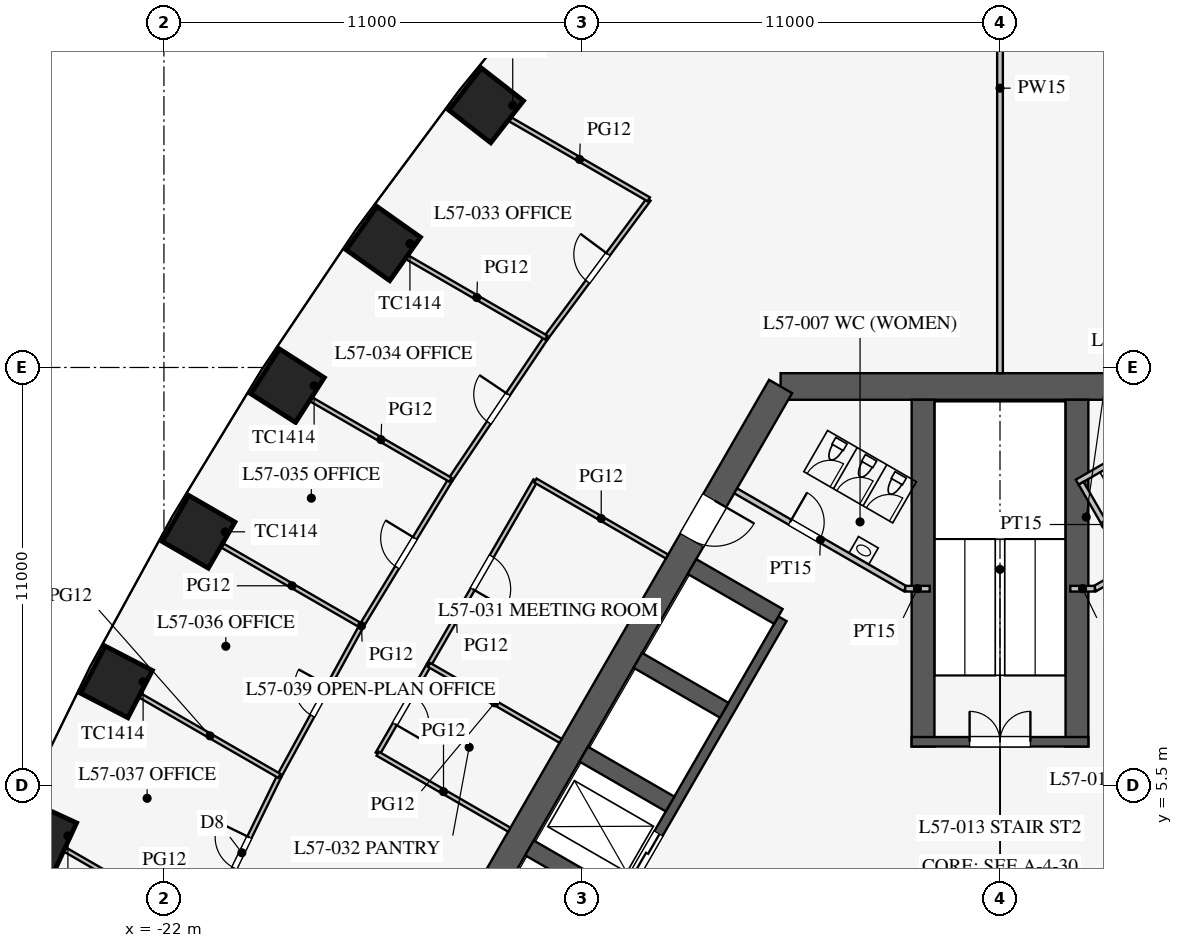
"""IFC4 building model, lengths in metres.
Left out: names, types, materials, properties, quantities, classifications, styles, units other than length and angle.
Written with IfcOpenShell. Run it as: python <this file> out.ifc"""

import sys

from ifc_helpers import new_model, si_unit, direction, frame, frame_2d, origin, origin_2d, place, context, subcontext, project, spatial, rectangle, extrude, element, fill, save


model = new_model("IFC4")
c1 = context("Model", 3, precision=1e-05, world=origin(), true_north=direction((0.0, 1.0)))
c2 = subcontext(c1, "Body", "Model", "MODEL_VIEW")
j1 = project(units=[si_unit("LENGTHUNIT", "METRE"), si_unit("PLANEANGLEUNIT", "RADIAN")], contexts=[c1])
p1 = place(None, origin())
s1 = spatial("IfcSite", under=j1, at=p1, CompositionType="ELEMENT")
p2 = place(p1, origin())
s2 = spatial("IfcBuilding", under=s1, at=p2, CompositionType="ELEMENT")
p3 = place(p2, frame((0.0, 0.0, 248.5)))
s3 = spatial("IfcBuildingStorey", under=s2, at=p3, CompositionType="ELEMENT", Elevation=248.5)
for number, where, z_axis, x_axis in (
    (1, (-13.522, 23.396, 0.0), (0.0, 0.0, 1.0), (-0.615, -0.789, 0.0)),
    (2, (-16.227, 19.761, 0.0), (0.0, 0.0, 1.0), (-0.577, -0.816, 0.0)),
    (3, (-18.748, 16.02, 0.0), (0.0, 0.0, 1.0), (-0.539, -0.842, 0.0)),
    (4, (-21.088, 12.175, 0.0), (0.0, 0.0, 1.0), (-0.5, -0.866, 0.0)),
    (5, (-23.248, 8.226, 0.0), (0.0, 0.0, 1.0), (-0.46, -0.888, 0.0)),
    (6, (-25.227, 4.172, 0.0), (0.0, 0.0, 1.0), (-0.418, -0.908, 0.0)),
):
    element("IfcColumn", number, at=place(p3, frame(where, z_axis=z_axis, x_axis=x_axis)), inside=s3, PredefinedType="COLUMN", context=c2, shape_type="SweptSolid", body=[
        extrude(rectangle(XDim=1.4, YDim=1.4, at=origin_2d()), origin(), (0.0, 0.0, 1.0), 4.2),
    ])
p4 = place(p3, frame((5.773, 16.0, 0.0), z_axis=(0.0, 0.0, 1.0), x_axis=(-1.0, 0.0, 0.0)))
e7 = element("IfcWall", 7, at=p4, inside=s3, PredefinedType="SHEAR", context=c2, shape_type="SweptSolid", body=[
    extrude(rectangle(XDim=11.547, YDim=0.7, at=frame_2d((5.773, 0.0))), origin(), (0.0, 0.0, 1.0), 4.2),
])
p5 = place(p3, frame((-5.773, 16.0, 0.0), z_axis=(0.0, 0.0, 1.0), x_axis=(-0.500002442456, -0.866023993627, 0.0)))
e8 = element("IfcWall", 8, at=p5, inside=s3, PredefinedType="SHEAR", context=c2, shape_type="SweptSolid", body=[
    extrude(rectangle(XDim=21.939, YDim=0.7, at=frame_2d((10.97, 0.0))), origin(), (0.0, 0.0, 1.0), 4.2),
])
p6 = place(p5, frame((17.27, 0.0, 0.0)))
e9 = element("IfcOpeningElement", 9, at=p6, cuts=e8, PredefinedType="OPENING", context=c2, shape_type="SweptSolid", body=[
    extrude(rectangle(XDim=1.2, YDim=2.1, at=frame_2d((0.6, 1.05))), frame((0.0, 0.36, 0.0), z_axis=(0.0, -1.0, 0.0), x_axis=(1.0, 0.0, 0.0)), (0.0, 0.0, 1.0), 0.72),
])
p7 = place(p5, frame((3.47, 0.0, 0.0)))
e10 = element("IfcOpeningElement", 10, at=p7, cuts=e8, PredefinedType="OPENING", context=c2, shape_type="SweptSolid", body=[
    extrude(rectangle(XDim=1.2, YDim=2.1, at=frame_2d((0.6, 1.05))), frame((0.0, 0.36, 0.0), z_axis=(0.0, -1.0, 0.0), x_axis=(1.0, 0.0, 0.0)), (0.0, 0.0, 1.0), 0.72),
])
p8 = place(p3, frame((-5.724, 9.886, 0.0), z_axis=(0.0, 0.0, 1.0), x_axis=(-0.500001763848, -0.866024385424, 0.0)))
e11 = element("IfcWall", 11, at=p8, inside=s3, PredefinedType="SHEAR", context=c2, shape_type="SweptSolid", body=[
    extrude(rectangle(XDim=11.4, YDim=0.25, at=frame_2d((5.7, 0.0))), origin(), (0.0, 0.0, 1.0), 4.2),
])
p9 = place(p8, frame((6.525, 0.0, 0.0)))
e12 = element("IfcOpeningElement", 12, at=p9, cuts=e11, PredefinedType="OPENING", context=c2, shape_type="SweptSolid", body=[
    extrude(rectangle(XDim=1.2, YDim=2.2, at=frame_2d((0.6, 1.1))), frame((0.0, 0.135, 0.0), z_axis=(0.0, -1.0, 0.0), x_axis=(1.0, 0.0, 0.0)), (0.0, 0.0, 1.0), 0.27),
])
p10 = place(p8, frame((9.375, 0.0, 0.0)))
e13 = element("IfcOpeningElement", 13, at=p10, cuts=e11, PredefinedType="OPENING", context=c2, shape_type="SweptSolid", body=[
    extrude(rectangle(XDim=1.2, YDim=2.2, at=frame_2d((0.6, 1.1))), frame((0.0, 0.135, 0.0), z_axis=(0.0, -1.0, 0.0), x_axis=(1.0, 0.0, 0.0)), (0.0, 0.0, 1.0), 0.27),
])
for number, where, z_axis, x_axis in (
    (14, (-5.832, 9.949, 0.0), (0.0, 0.0, 1.0), (-0.866, 0.5, 0.0)),
    (15, (-7.257, 7.481, 0.0), (0.0, 0.0, 1.0), (-0.866, 0.5, 0.0)),
    (16, (-8.682, 5.012, 0.0), (0.0, 0.0, 1.0), (-0.866, 0.5, 0.0)),
    (17, (-10.107, 2.544, 0.0), (0.0, 0.0, 1.0), (-0.866, 0.5, 0.0)),
):
    element("IfcWall", number, at=place(p3, frame(where, z_axis=z_axis, x_axis=x_axis)), inside=s3, PredefinedType="SHEAR", context=c2, shape_type="SweptSolid", body=[
        extrude(rectangle(XDim=2.625, YDim=0.45, at=frame_2d((1.312, 0.0))), origin(), (0.0, 0.0, 1.0), 4.2),
    ])
for number, where, z_axis, x_axis in (
    (18, (2.025, 6.525, 0.0), (0.0, 0.0, 1.0), (0.0, 1.0, 0.0)),
    (19, (-2.025, 6.525, 0.0), (0.0, 0.0, 1.0), (0.0, 1.0, 0.0)),
):
    element("IfcWall", number, at=place(p3, frame(where, z_axis=z_axis, x_axis=x_axis)), inside=s3, PredefinedType="SHEAR", context=c2, shape_type="SweptSolid", body=[
        extrude(rectangle(XDim=9.125, YDim=0.6, at=frame_2d((4.562, 0.0))), origin(), (0.0, 0.0, 1.0), 4.2),
    ])
p11 = place(p3, frame((2.325, 6.65, 0.0), z_axis=(0.0, 0.0, 1.0), x_axis=(-1.0, 0.0, 0.0)))
e20 = element("IfcWall", 20, at=p11, inside=s3, PredefinedType="SHEAR", context=c2, shape_type="SweptSolid", body=[
    extrude(rectangle(XDim=4.65, YDim=0.25, at=frame_2d((2.325, 0.0))), origin(), (0.0, 0.0, 1.0), 4.2),
])
p12 = place(p11, frame((1.525, 0.0, 0.0)))
e21 = element("IfcOpeningElement", 21, at=p12, cuts=e20, PredefinedType="OPENING", context=c2, shape_type="SweptSolid", body=[
    extrude(rectangle(XDim=1.6, YDim=2.1, at=frame_2d((0.8, 1.05))), frame((0.0, 0.135, 0.0), z_axis=(0.0, -1.0, 0.0), x_axis=(1.0, 0.0, 0.0)), (0.0, 0.0, 1.0), 0.27),
])
p13 = place(p3, frame((2.495, 10.678, 0.0), z_axis=(0.0, 0.0, 1.0), x_axis=(0.866037967349, 0.499978238636, 0.0)))
e22 = element("IfcWall", 22, at=p13, inside=s3, PredefinedType="PARTITIONING", context=c2, shape_type="SweptSolid", body=[
    extrude(rectangle(XDim=5.15, YDim=0.15, at=frame_2d((2.575, 0.0))), origin(), (0.0, 0.0, 1.0), 4.0),
])
p14 = place(p13, frame((1.3, 0.0, 0.0)))
e23 = element("IfcOpeningElement", 23, at=p14, cuts=e22, PredefinedType="OPENING", context=c2, shape_type="SweptSolid", body=[
    extrude(rectangle(XDim=0.9, YDim=2.1, at=frame_2d((0.45, 1.05))), frame((0.0, 0.085, 0.0), z_axis=(0.0, -1.0, 0.0), x_axis=(1.0, 0.0, 0.0)), (0.0, 0.0, 1.0), 0.17),
])
p15 = place(p3, frame((-2.495, 10.678, 0.0), z_axis=(0.0, 0.0, 1.0), x_axis=(-0.866037967349, 0.499978238636, 0.0)))
e24 = element("IfcWall", 24, at=p15, inside=s3, PredefinedType="PARTITIONING", context=c2, shape_type="SweptSolid", body=[
    extrude(rectangle(XDim=5.15, YDim=0.15, at=frame_2d((2.575, 0.0))), origin(), (0.0, 0.0, 1.0), 4.0),
])
p16 = place(p15, frame((2.6, 0.0, 0.0)))
e25 = element("IfcOpeningElement", 25, at=p16, cuts=e24, PredefinedType="OPENING", context=c2, shape_type="SweptSolid", body=[
    extrude(rectangle(XDim=0.9, YDim=2.1, at=frame_2d((0.45, 1.05))), frame((0.0, 0.085, 0.0), z_axis=(0.0, -1.0, 0.0), x_axis=(1.0, 0.0, 0.0)), (0.0, 0.0, 1.0), 0.17),
])
for number, where, z_axis, x_axis in (
    (26, (2.495, 10.678, 0.0), (0.0, 0.0, 1.0), (-1.0, 0.0, 0.0)),
    (27, (-2.495, 10.678, 0.0), (0.0, 0.0, 1.0), (1.0, 0.0, 0.0)),
):
    element("IfcWall", number, at=place(p3, frame(where, z_axis=z_axis, x_axis=x_axis)), inside=s3, PredefinedType="PARTITIONING", context=c2, shape_type="SweptSolid", body=[
        extrude(rectangle(XDim=0.645, YDim=0.15, at=frame_2d((0.323, 0.0))), origin(), (0.0, 0.0, 1.0), 4.0),
    ])
p17 = place(p3, frame((2.031, 13.482, 0.0), z_axis=(0.0, 0.0, 1.0), x_axis=(0.866050731258, 0.499956128963, 0.0)))
e28 = element("IfcWall", 28, at=p17, inside=s3, PredefinedType="PARTITIONING", context=c2, shape_type="SweptSolid", body=[
    extrude(rectangle(XDim=4.1, YDim=0.15, at=frame_2d((2.05, 0.0))), origin(), (0.0, 0.0, 1.0), 4.0),
])
p18 = place(p3, frame((3.389, 11.281, 0.0), z_axis=(0.0, 0.0, 1.0), x_axis=(-0.499989096993, 0.866031698547, 0.0)))
e29 = element("IfcWall", 29, at=p18, inside=s3, PredefinedType="PARTITIONING", context=c2, shape_type="SweptSolid", body=[
    extrude(rectangle(XDim=2.51, YDim=0.15, at=frame_2d((1.255, 0.0))), origin(), (0.0, 0.0, 1.0), 4.0),
])
p19 = place(p3, frame((0.0, 16.35, 0.0), z_axis=(0.0, 0.0, 1.0), x_axis=(0.0, 1.0, 0.0)))
e30 = element("IfcWall", 30, at=p19, inside=s3, PredefinedType="PARTITIONING", context=c2, shape_type="SweptSolid", body=[
    extrude(rectangle(XDim=15.0, YDim=0.15, at=frame_2d((7.5, 0.0))), origin(), (0.0, 0.0, 1.0), 2.4),
])
p20 = place(p3, frame((-15.026, 8.675, 0.0), z_axis=(0.0, 0.0, 1.0), x_axis=(-0.4999416173, -0.866059108428, 0.0)))
e31 = element("IfcWall", 31, at=p20, inside=s3, PredefinedType="PARTITIONING", context=c2, shape_type="SweptSolid", body=[
    extrude(rectangle(XDim=2.7, YDim=0.12, at=frame_2d((1.35, 0.0))), origin(), (0.0, 0.0, 1.0), 2.9),
])
p21 = place(p20, frame((0.9, 0.0, 0.15)))
e32 = element("IfcOpeningElement", 32, at=p21, cuts=e31, PredefinedType="OPENING", context=c2, shape_type="SweptSolid", body=[
    extrude(rectangle(XDim=0.9, YDim=2.1, at=frame_2d((0.45, 1.05))), frame((0.0, 0.07, 0.0), z_axis=(0.0, -1.0, 0.0), x_axis=(1.0, 0.0, 0.0)), (0.0, 0.0, 1.0), 0.14),
])
p22 = place(p3, frame((-12.226, 13.525, 0.0), z_axis=(0.0, 0.0, 1.0), x_axis=(-0.500016814911, -0.866015695474, 0.0)))
e33 = element("IfcWall", 33, at=p22, inside=s3, PredefinedType="PARTITIONING", context=c2, shape_type="SweptSolid", body=[
    extrude(rectangle(XDim=5.6, YDim=0.12, at=frame_2d((2.8, 0.0))), origin(), (0.0, 0.0, 1.0), 2.9),
])
p23 = place(p22, frame((2.3, 0.0, 0.15)))
e34 = element("IfcOpeningElement", 34, at=p23, cuts=e33, PredefinedType="OPENING", context=c2, shape_type="SweptSolid", body=[
    extrude(rectangle(XDim=1.0, YDim=2.1, at=frame_2d((0.5, 1.05))), frame((0.0, 0.07, 0.0), z_axis=(0.0, -1.0, 0.0), x_axis=(1.0, 0.0, 0.0)), (0.0, 0.0, 1.0), 0.14),
])
for number, where, z_axis, x_axis in (
    (35, (-12.911, 4.337, 0.0), (0.0, 0.0, 1.0), (-0.866, 0.5, 0.0)),
    (36, (-11.562, 6.675, 0.0), (0.0, 0.0, 1.0), (-0.866, 0.5, 0.0)),
    (37, (-8.761, 11.525, 0.0), (0.0, 0.0, 1.0), (-0.866, 0.5, 0.0)),
):
    element("IfcWall", number, at=place(p3, frame(where, z_axis=z_axis, x_axis=x_axis)), inside=s3, PredefinedType="PARTITIONING", context=c2, shape_type="SweptSolid", body=[
        extrude(rectangle(XDim=4.0, YDim=0.12, at=frame_2d((2.0, 0.0))), origin(), (0.0, 0.0, 1.0), 2.9),
    ])
p24 = place(p3, frame((-16.802, 9.7, 0.0), z_axis=(0.0, 0.0, 1.0), x_axis=(-0.479949984371, -0.877295852322, 0.0)))
e38 = element("IfcWall", 38, at=p24, inside=s3, PredefinedType="PARTITIONING", context=c2, shape_type="SweptSolid", body=[
    extrude(rectangle(XDim=4.501, YDim=0.12, at=frame_2d((2.25, 0.0))), origin(), (0.0, 0.0, 1.0), 2.9),
])
p25 = place(p24, frame((1.8, 0.0, 0.15)))
e39 = element("IfcOpeningElement", 39, at=p25, cuts=e38, PredefinedType="OPENING", context=c2, shape_type="SweptSolid", body=[
    extrude(rectangle(XDim=0.9, YDim=2.1, at=frame_2d((0.45, 1.05))), frame((0.0, 0.07, 0.0), z_axis=(0.0, -1.0, 0.0), x_axis=(1.0, 0.0, 0.0)), (0.0, 0.0, 1.0), 0.14),
])
p26 = place(p3, frame((-18.962, 5.751, 0.0), z_axis=(0.0, 0.0, 1.0), x_axis=(-0.43911984878, -0.898428493764, 0.0)))
e40 = element("IfcWall", 40, at=p26, inside=s3, PredefinedType="PARTITIONING", context=c2, shape_type="SweptSolid", body=[
    extrude(rectangle(XDim=4.511, YDim=0.12, at=frame_2d((2.255, 0.0))), origin(), (0.0, 0.0, 1.0), 2.9),
])
p27 = place(p26, frame((1.8, 0.0, 0.15)))
e41 = element("IfcOpeningElement", 41, at=p27, cuts=e40, PredefinedType="OPENING", context=c2, shape_type="SweptSolid", body=[
    extrude(rectangle(XDim=0.9, YDim=2.1, at=frame_2d((0.45, 1.05))), frame((0.0, 0.07, 0.0), z_axis=(0.0, -1.0, 0.0), x_axis=(1.0, 0.0, 0.0)), (0.0, 0.0, 1.0), 0.14),
])
p28 = place(p3, frame((-9.242, 20.924, 0.0), z_axis=(0.0, 0.0, 1.0), x_axis=(-0.59613842716, -0.802881669777, 0.0)))
e42 = element("IfcWall", 42, at=p28, inside=s3, PredefinedType="PARTITIONING", context=c2, shape_type="SweptSolid", body=[
    extrude(rectangle(XDim=4.53, YDim=0.12, at=frame_2d((2.265, 0.0))), origin(), (0.0, 0.0, 1.0), 2.9),
])
p29 = place(p28, frame((1.8, 0.0, 0.15)))
e43 = element("IfcOpeningElement", 43, at=p29, cuts=e42, PredefinedType="OPENING", context=c2, shape_type="SweptSolid", body=[
    extrude(rectangle(XDim=0.9, YDim=2.1, at=frame_2d((0.45, 1.05))), frame((0.0, 0.07, 0.0), z_axis=(0.0, -1.0, 0.0), x_axis=(1.0, 0.0, 0.0)), (0.0, 0.0, 1.0), 0.14),
])
p30 = place(p3, frame((-14.462, 13.546, 0.0), z_axis=(0.0, 0.0, 1.0), x_axis=(-0.519790350351, -0.85429385558, 0.0)))
e44 = element("IfcWall", 44, at=p30, inside=s3, PredefinedType="PARTITIONING", context=c2, shape_type="SweptSolid", body=[
    extrude(rectangle(XDim=4.501, YDim=0.12, at=frame_2d((2.25, 0.0))), origin(), (0.0, 0.0, 1.0), 2.9),
])
p31 = place(p30, frame((1.8, 0.0, 0.15)))
e45 = element("IfcOpeningElement", 45, at=p31, cuts=e44, PredefinedType="OPENING", context=c2, shape_type="SweptSolid", body=[
    extrude(rectangle(XDim=0.9, YDim=2.1, at=frame_2d((0.45, 1.05))), frame((0.0, 0.07, 0.0), z_axis=(0.0, -1.0, 0.0), x_axis=(1.0, 0.0, 0.0)), (0.0, 0.0, 1.0), 0.14),
])
p32 = place(p3, frame((-11.943, 17.287, 0.0), z_axis=(0.0, 0.0, 1.0), x_axis=(-0.55850386778, -0.829501916619, 0.0)))
e46 = element("IfcWall", 46, at=p32, inside=s3, PredefinedType="PARTITIONING", context=c2, shape_type="SweptSolid", body=[
    extrude(rectangle(XDim=4.511, YDim=0.12, at=frame_2d((2.255, 0.0))), origin(), (0.0, 0.0, 1.0), 2.9),
])
p33 = place(p32, frame((1.8, 0.0, 0.15)))
e47 = element("IfcOpeningElement", 47, at=p33, cuts=e46, PredefinedType="OPENING", context=c2, shape_type="SweptSolid", body=[
    extrude(rectangle(XDim=0.9, YDim=2.1, at=frame_2d((0.45, 1.05))), frame((0.0, 0.07, 0.0), z_axis=(0.0, -1.0, 0.0), x_axis=(1.0, 0.0, 0.0)), (0.0, 0.0, 1.0), 0.14),
])
p34 = place(p3, frame((-16.802, 9.7, 0.0), z_axis=(0.0, 0.0, 1.0), x_axis=(-0.866034326667, 0.499984544796, 0.0)))
e48 = element("IfcWall", 48, at=p34, inside=s3, PredefinedType="PARTITIONING", context=c2, shape_type="SweptSolid", body=[
    extrude(rectangle(XDim=4.22, YDim=0.12, at=frame_2d((2.11, 0.0))), origin(), (0.0, 0.0, 1.0), 2.9),
])
p35 = place(p3, frame((-18.962, 5.751, 0.0), z_axis=(0.0, 0.0, 1.0), x_axis=(-0.866037167642, 0.499979623848, 0.0)))
e49 = element("IfcWall", 49, at=p35, inside=s3, PredefinedType="PARTITIONING", context=c2, shape_type="SweptSolid", body=[
    extrude(rectangle(XDim=4.219, YDim=0.12, at=frame_2d((2.109, 0.0))), origin(), (0.0, 0.0, 1.0), 2.9),
])
p36 = place(p3, frame((-20.943, 1.699, 0.0), z_axis=(0.0, 0.0, 1.0), x_axis=(-0.866041823485, 0.499971559166, 0.0)))
e50 = element("IfcWall", 50, at=p36, inside=s3, PredefinedType="PARTITIONING", context=c2, shape_type="SweptSolid", body=[
    extrude(rectangle(XDim=4.214, YDim=0.12, at=frame_2d((2.107, 0.0))), origin(), (0.0, 0.0, 1.0), 2.9),
])
p37 = place(p3, frame((-9.242, 20.924, 0.0), z_axis=(0.0, 0.0, 1.0), x_axis=(-0.866008660113, 0.500028999769, 0.0)))
e51 = element("IfcWall", 51, at=p37, inside=s3, PredefinedType="PARTITIONING", context=c2, shape_type="SweptSolid", body=[
    extrude(rectangle(XDim=4.205, YDim=0.12, at=frame_2d((2.103, 0.0))), origin(), (0.0, 0.0, 1.0), 2.8),
])
p38 = place(p3, frame((-14.462, 13.546, 0.0), z_axis=(0.0, 0.0, 1.0), x_axis=(-0.866012107475, 0.500023029176, 0.0)))
e52 = element("IfcWall", 52, at=p38, inside=s3, PredefinedType="PARTITIONING", context=c2, shape_type="SweptSolid", body=[
    extrude(rectangle(XDim=4.219, YDim=0.12, at=frame_2d((2.109, 0.0))), origin(), (0.0, 0.0, 1.0), 2.9),
])
p39 = place(p3, frame((-11.943, 17.287, 0.0), z_axis=(0.0, 0.0, 1.0), x_axis=(-0.866016734951, 0.50001501456, 0.0)))
e53 = element("IfcWall", 53, at=p39, inside=s3, PredefinedType="PARTITIONING", context=c2, shape_type="SweptSolid", body=[
    extrude(rectangle(XDim=4.214, YDim=0.12, at=frame_2d((2.107, 0.0))), origin(), (0.0, 0.0, 1.0), 2.9),
])
p40 = place(p16, frame((0.9, 0.0, 0.0), z_axis=(0.0, 0.0, 1.0), x_axis=(-1.0, 0.0, 0.0)))
e54 = element("IfcDoor", 54, at=p40, inside=s3, OperationType="SINGLE_SWING_LEFT", PredefinedType="DOOR", context=c2, shape_type="SweptSolid", body=[
    extrude(rectangle(XDim=0.9, YDim=2.1, at=frame_2d((0.45, 1.05))), frame((0.0, 0.025, 0.0), z_axis=(0.0, -1.0, 0.0), x_axis=(1.0, 0.0, 0.0)), (0.0, 0.0, 1.0), 0.05),
])
fill(e25, e54)
p41 = place(p12, frame((1.6, 0.0, 0.0), z_axis=(0.0, 0.0, 1.0), x_axis=(-1.0, 0.0, 0.0)))
e55 = element("IfcDoor", 55, at=p41, inside=s3, OperationType="DOUBLE_DOOR_SINGLE_SWING", PredefinedType="DOOR", context=c2, shape_type="SweptSolid", body=[
    extrude(rectangle(XDim=1.6, YDim=2.1, at=frame_2d((0.8, 1.05))), frame((0.0, 0.025, 0.0), z_axis=(0.0, -1.0, 0.0), x_axis=(1.0, 0.0, 0.0)), (0.0, 0.0, 1.0), 0.05),
])
fill(e21, e55)
p42 = place(p7, origin())
e56 = element("IfcDoor", 56, at=p42, inside=s3, OperationType="SINGLE_SWING_LEFT", PredefinedType="DOOR", context=c2, shape_type="SweptSolid", body=[
    extrude(rectangle(XDim=1.2, YDim=2.1, at=frame_2d((0.6, 1.05))), frame((0.0, 0.025, 0.0), z_axis=(0.0, -1.0, 0.0), x_axis=(1.0, 0.0, 0.0)), (0.0, 0.0, 1.0), 0.05),
])
fill(e10, e56)
p43 = place(p23, origin())
e57 = element("IfcDoor", 57, at=p43, inside=s3, OperationType="SINGLE_SWING_RIGHT", PredefinedType="DOOR", context=c2, shape_type="SweptSolid", body=[
    extrude(rectangle(XDim=1.0, YDim=2.1, at=frame_2d((0.5, 1.05))), frame((0.0, 0.025, 0.0), z_axis=(0.0, -1.0, 0.0), x_axis=(1.0, 0.0, 0.0)), (0.0, 0.0, 1.0), 0.05),
])
fill(e34, e57)
p44 = place(p21, origin())
e58 = element("IfcDoor", 58, at=p44, inside=s3, OperationType="SINGLE_SWING_RIGHT", PredefinedType="DOOR", context=c2, shape_type="SweptSolid", body=[
    extrude(rectangle(XDim=0.9, YDim=2.1, at=frame_2d((0.45, 1.05))), frame((0.0, 0.025, 0.0), z_axis=(0.0, -1.0, 0.0), x_axis=(1.0, 0.0, 0.0)), (0.0, 0.0, 1.0), 0.05),
])
fill(e32, e58)
p45 = place(p29, frame((0.9, 0.0, 0.0), z_axis=(0.0, 0.0, 1.0), x_axis=(-1.0, 0.0, 0.0)))
e59 = element("IfcDoor", 59, at=p45, inside=s3, OperationType="SINGLE_SWING_RIGHT", PredefinedType="DOOR", context=c2, shape_type="SweptSolid", body=[
    extrude(rectangle(XDim=0.9, YDim=2.1, at=frame_2d((0.45, 1.05))), frame((0.0, 0.025, 0.0), z_axis=(0.0, -1.0, 0.0), x_axis=(1.0, 0.0, 0.0)), (0.0, 0.0, 1.0), 0.05),
])
fill(e43, e59)
p46 = place(p33, frame((0.9, 0.0, 0.0), z_axis=(0.0, 0.0, 1.0), x_axis=(-1.0, 0.0, 0.0)))
e60 = element("IfcDoor", 60, at=p46, inside=s3, OperationType="SINGLE_SWING_RIGHT", PredefinedType="DOOR", context=c2, shape_type="SweptSolid", body=[
    extrude(rectangle(XDim=0.9, YDim=2.1, at=frame_2d((0.45, 1.05))), frame((0.0, 0.025, 0.0), z_axis=(0.0, -1.0, 0.0), x_axis=(1.0, 0.0, 0.0)), (0.0, 0.0, 1.0), 0.05),
])
fill(e47, e60)
p47 = place(p31, frame((0.9, 0.0, 0.0), z_axis=(0.0, 0.0, 1.0), x_axis=(-1.0, 0.0, 0.0)))
e61 = element("IfcDoor", 61, at=p47, inside=s3, OperationType="SINGLE_SWING_RIGHT", PredefinedType="DOOR", context=c2, shape_type="SweptSolid", body=[
    extrude(rectangle(XDim=0.9, YDim=2.1, at=frame_2d((0.45, 1.05))), frame((0.0, 0.025, 0.0), z_axis=(0.0, -1.0, 0.0), x_axis=(1.0, 0.0, 0.0)), (0.0, 0.0, 1.0), 0.05),
])
fill(e45, e61)
p48 = place(p25, frame((0.9, 0.0, 0.0), z_axis=(0.0, 0.0, 1.0), x_axis=(-1.0, 0.0, 0.0)))
e62 = element("IfcDoor", 62, at=p48, inside=s3, OperationType="SINGLE_SWING_RIGHT", PredefinedType="DOOR", context=c2, shape_type="SweptSolid", body=[
    extrude(rectangle(XDim=0.9, YDim=2.1, at=frame_2d((0.45, 1.05))), frame((0.0, 0.025, 0.0), z_axis=(0.0, -1.0, 0.0), x_axis=(1.0, 0.0, 0.0)), (0.0, 0.0, 1.0), 0.05),
])
fill(e39, e62)
p49 = place(p27, frame((0.9, 0.0, 0.0), z_axis=(0.0, 0.0, 1.0), x_axis=(-1.0, 0.0, 0.0)))
e63 = element("IfcDoor", 63, at=p49, inside=s3, OperationType="SINGLE_SWING_RIGHT", PredefinedType="DOOR", context=c2, shape_type="SweptSolid", body=[
    extrude(rectangle(XDim=0.9, YDim=2.1, at=frame_2d((0.45, 1.05))), frame((0.0, 0.025, 0.0), z_axis=(0.0, -1.0, 0.0), x_axis=(1.0, 0.0, 0.0)), (0.0, 0.0, 1.0), 0.05),
])
fill(e41, e63)
p50 = place(p9, origin())
e64 = element("IfcDoor", 64, at=p50, inside=s3, OperationType="DOUBLE_DOOR_SLIDING", PredefinedType="DOOR", context=c2, shape_type="SweptSolid", body=[
    extrude(rectangle(XDim=1.2, YDim=2.2, at=frame_2d((0.6, 1.1))), frame((0.0, 0.025, 0.0), z_axis=(0.0, -1.0, 0.0), x_axis=(1.0, 0.0, 0.0)), (0.0, 0.0, 1.0), 0.05),
])
fill(e12, e64)
save(model, sys.argv[1])
